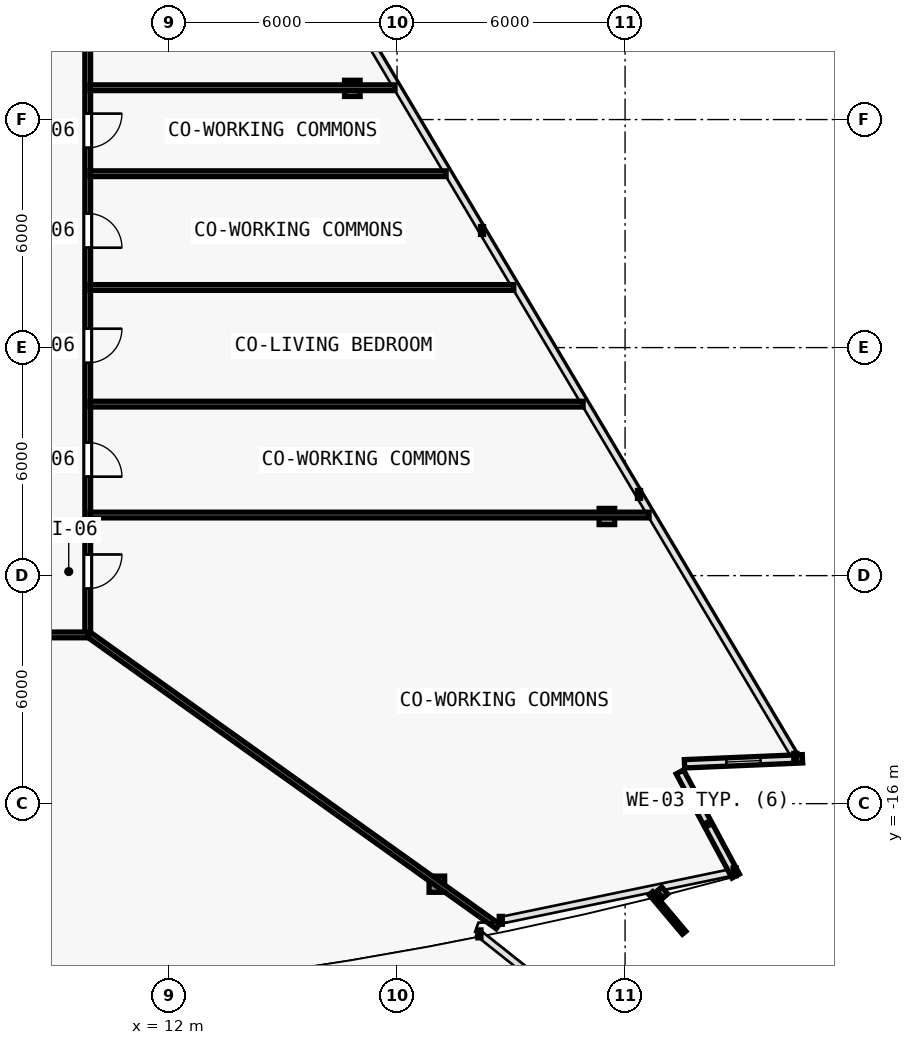
"""IFC4 building model, lengths in metres.
Left out: names, types, materials, properties, quantities, classifications, styles, units other than length and angle.
Written with IfcOpenShell. Run it as: python <this file> out.ifc"""

import sys

from ifc_helpers import new_model, si_unit, direction, frame, frame_2d, origin, origin_2d, place, context, subcontext, project, spatial, rectangle, i_section, extrude, element, fill, save


model = new_model("IFC4")
c1 = context("Model", 3, precision=1e-05, world=origin(), true_north=direction((0.0, 1.0)))
c2 = subcontext(c1, "Body", "Model", "MODEL_VIEW")
j1 = project(units=[si_unit("LENGTHUNIT", "METRE"), si_unit("PLANEANGLEUNIT", "RADIAN")], contexts=[c1])
p1 = place(None, origin())
s1 = spatial("IfcSite", under=j1, at=p1, CompositionType="ELEMENT")
p2 = place(p1, origin())
s2 = spatial("IfcBuilding", under=s1, at=p2, CompositionType="ELEMENT")
p3 = place(p2, frame((0.0, 0.0, 93.3)))
s3 = spatial("IfcBuildingStorey", under=s2, at=p3, CompositionType="ELEMENT", Elevation=93.3)
p4 = place(p3, frame((19.047, -18.119, 0.005), z_axis=(-0.020594847032, 0.03357707734, 0.999223914922), x_axis=(-0.852427604955, -0.522845271865, 0.0)))
e1 = element("IfcColumn", 1, at=p4, inside=s3, PredefinedType="COLUMN", context=c2, shape_type="SweptSolid", body=[
    extrude(i_section(OverallWidth=0.409, OverallDepth=0.425, WebThickness=0.021, FlangeThickness=0.034, FilletRadius=0.015, at=origin_2d()), origin(), (0.0, 0.0, 1.0), 3.592),
])
p5 = place(p3, frame((23.521, -8.444, 0.005), z_axis=(-0.026105663043, 0.021618752208, 0.999425396871), x_axis=(-0.637813971185, -0.770190455771, 0.0)))
e2 = element("IfcColumn", 2, at=p5, inside=s3, PredefinedType="COLUMN", context=c2, shape_type="SweptSolid", body=[
    extrude(i_section(OverallWidth=0.409, OverallDepth=0.425, WebThickness=0.021, FlangeThickness=0.034, FilletRadius=0.015, at=origin_2d()), origin(), (0.0, 0.0, 1.0), 3.591),
])
p6 = place(p3, frame((16.823, 2.821, 0.005), z_axis=(-0.018974023902, 0.009521015578, 0.999774642947), x_axis=(-0.44849454954, -0.893785566583, 0.0)))
e3 = element("IfcColumn", 3, at=p6, inside=s3, PredefinedType="COLUMN", context=c2, shape_type="SweptSolid", body=[
    extrude(i_section(OverallWidth=0.409, OverallDepth=0.425, WebThickness=0.021, FlangeThickness=0.034, FilletRadius=0.015, at=origin_2d()), origin(), (0.0, 0.0, 1.0), 3.59),
])
p7 = place(p3, frame((25.442, -15.165, 0.0), z_axis=(0.0, 0.0, 1.0), x_axis=(0.472811757317, -0.881163459378, 0.0)))
e4 = element("IfcWall", 4, at=p7, inside=s3, PredefinedType="SOLIDWALL", context=c2, shape_type="SweptSolid", body=[
    extrude(rectangle(XDim=3.11, YDim=0.22, at=frame_2d((1.555, 0.0))), origin(), (0.0, 0.0, 1.0), 3.35),
])
p8 = place(p3, frame((28.667, -14.819, 0.0), z_axis=(0.0, 0.0, 1.0), x_axis=(-0.99909228571, -0.042598176436, 0.0)))
e5 = element("IfcWall", 5, at=p8, inside=s3, PredefinedType="SOLIDWALL", context=c2, shape_type="SweptSolid", body=[
    extrude(rectangle(XDim=3.106, YDim=0.22, at=frame_2d((1.553, 0.0))), origin(), (0.0, 0.0, 1.0), 3.35),
])
p9 = place(p8, frame((1.103, 0.0, 0.62)))
e6 = element("IfcOpeningElement", 6, at=p9, cuts=e5, PredefinedType="OPENING", context=c2, shape_type="SweptSolid", body=[
    extrude(rectangle(XDim=0.9, YDim=1.6, at=frame_2d((0.45, 0.8))), frame((0.0, 0.12, 0.0), z_axis=(0.0, -1.0, 0.0), x_axis=(1.0, 0.0, 0.0)), (0.0, 0.0, 1.0), 0.24),
])
p10 = place(p3, frame((9.86, 8.426, 0.0), z_axis=(0.0, 0.0, 1.0), x_axis=(0.0, -1.0, 0.0)))
e7 = element("IfcWall", 7, at=p10, inside=s3, PredefinedType="PARTITIONING", context=c2, shape_type="SweptSolid", body=[
    extrude(rectangle(XDim=19.986, YDim=0.15, at=frame_2d((9.993, 0.0))), origin(), (0.0, 0.0, 1.0), 2.705),
])
p11 = place(p10, frame((17.869, 0.0, 0.0)))
e8 = element("IfcOpeningElement", 8, at=p11, cuts=e7, PredefinedType="OPENING", context=c2, shape_type="SweptSolid", body=[
    extrude(rectangle(XDim=0.9, YDim=2.1, at=frame_2d((0.45, 1.05))), frame((0.0, 0.085, 0.0), z_axis=(0.0, -1.0, 0.0), x_axis=(1.0, 0.0, 0.0)), (0.0, 0.0, 1.0), 0.17),
])
p12 = place(p10, frame((14.922, 0.0, 0.0)))
e9 = element("IfcOpeningElement", 9, at=p12, cuts=e7, PredefinedType="OPENING", context=c2, shape_type="SweptSolid", body=[
    extrude(rectangle(XDim=0.9, YDim=2.1, at=frame_2d((0.45, 1.05))), frame((0.0, 0.085, 0.0), z_axis=(0.0, -1.0, 0.0), x_axis=(1.0, 0.0, 0.0)), (0.0, 0.0, 1.0), 0.17),
])
p13 = place(p10, frame((11.928, 0.0, 0.0)))
e10 = element("IfcOpeningElement", 10, at=p13, cuts=e7, PredefinedType="OPENING", context=c2, shape_type="SweptSolid", body=[
    extrude(rectangle(XDim=0.9, YDim=2.1, at=frame_2d((0.45, 1.05))), frame((0.0, 0.085, 0.0), z_axis=(0.0, -1.0, 0.0), x_axis=(1.0, 0.0, 0.0)), (0.0, 0.0, 1.0), 0.17),
])
p14 = place(p10, frame((8.897, 0.0, 0.0)))
e11 = element("IfcOpeningElement", 11, at=p14, cuts=e7, PredefinedType="OPENING", context=c2, shape_type="SweptSolid", body=[
    extrude(rectangle(XDim=0.9, YDim=2.1, at=frame_2d((0.45, 1.05))), frame((0.0, 0.085, 0.0), z_axis=(0.0, -1.0, 0.0), x_axis=(1.0, 0.0, 0.0)), (0.0, 0.0, 1.0), 0.17),
])
p15 = place(p10, frame((6.269, 0.0, 0.0)))
e12 = element("IfcOpeningElement", 12, at=p15, cuts=e7, PredefinedType="OPENING", context=c2, shape_type="SweptSolid", body=[
    extrude(rectangle(XDim=0.9, YDim=2.1, at=frame_2d((0.45, 1.05))), frame((0.0, 0.085, 0.0), z_axis=(0.0, -1.0, 0.0), x_axis=(1.0, 0.0, 0.0)), (0.0, 0.0, 1.0), 0.17),
])
p16 = place(p10, frame((2.433, 0.0, 0.0)))
e13 = element("IfcOpeningElement", 13, at=p16, cuts=e7, PredefinedType="OPENING", context=c2, shape_type="SweptSolid", body=[
    extrude(rectangle(XDim=0.9, YDim=2.1, at=frame_2d((0.45, 1.05))), frame((0.0, 0.085, 0.0), z_axis=(0.0, -1.0, 0.0), x_axis=(1.0, 0.0, 0.0)), (0.0, 0.0, 1.0), 0.17),
])
p17 = place(p3, frame((9.86, -11.56, 0.0), z_axis=(0.0, 0.0, 1.0), x_axis=(-1.0, 0.0, 0.0)))
e14 = element("IfcWall", 14, at=p17, inside=s3, PredefinedType="PARTITIONING", context=c2, shape_type="SweptSolid", body=[
    extrude(rectangle(XDim=6.78, YDim=0.15, at=frame_2d((3.39, 0.0))), origin(), (0.0, 0.0, 1.0), 2.825),
])
p18 = place(p17, frame((2.94, 0.0, 0.0)))
e15 = element("IfcOpeningElement", 15, at=p18, cuts=e14, PredefinedType="OPENING", context=c2, shape_type="SweptSolid", body=[
    extrude(rectangle(XDim=0.9, YDim=2.1, at=frame_2d((0.45, 1.05))), frame((0.0, 0.085, 0.0), z_axis=(0.0, -1.0, 0.0), x_axis=(1.0, 0.0, 0.0)), (0.0, 0.0, 1.0), 0.17),
])
p19 = place(p3, frame((9.896, -11.558, 0.0), z_axis=(0.0, 0.0, 1.0), x_axis=(0.81409664299, -0.580729417089, 0.0)))
e16 = element("IfcWall", 16, at=p19, inside=s3, PredefinedType="PARTITIONING", context=c2, shape_type="SweptSolid", body=[
    extrude(rectangle(XDim=13.212, YDim=0.15, at=frame_2d((6.606, 0.0))), origin(), (0.0, 0.0, 1.0), 2.775),
])
p20 = place(p3, frame((9.92, -8.405, 0.0), z_axis=(0.0, 0.0, 1.0), x_axis=(1.0, 0.0, 0.0)))
e17 = element("IfcWall", 17, at=p20, inside=s3, PredefinedType="PARTITIONING", context=c2, shape_type="SweptSolid", body=[
    extrude(rectangle(XDim=14.711, YDim=0.15, at=frame_2d((7.355, 0.0))), origin(), (0.0, 0.0, 1.0), 2.705),
])
p21 = place(p3, frame((9.92, 2.838, 0.0), z_axis=(0.0, 0.0, 1.0), x_axis=(1.0, 0.0, 0.0)))
e18 = element("IfcWall", 18, at=p21, inside=s3, PredefinedType="PARTITIONING", context=c2, shape_type="SweptSolid", body=[
    extrude(rectangle(XDim=8.025, YDim=0.15, at=frame_2d((4.013, 0.0))), origin(), (0.0, 0.0, 1.0), 2.835),
])
p22 = place(p3, frame((9.92, -2.418, 0.0), z_axis=(0.0, 0.0, 1.0), x_axis=(1.0, 0.0, 0.0)))
e19 = element("IfcWall", 19, at=p22, inside=s3, PredefinedType="PARTITIONING", context=c2, shape_type="SweptSolid", body=[
    extrude(rectangle(XDim=11.15, YDim=0.15, at=frame_2d((5.575, 0.0))), origin(), (0.0, 0.0, 1.0), 2.835),
])
p23 = place(p3, frame((9.92, -5.487, 0.0), z_axis=(0.0, 0.0, 1.0), x_axis=(1.0, 0.0, 0.0)))
e20 = element("IfcWall", 20, at=p23, inside=s3, PredefinedType="PARTITIONING", context=c2, shape_type="SweptSolid", body=[
    extrude(rectangle(XDim=12.975, YDim=0.15, at=frame_2d((6.488, 0.0))), origin(), (0.0, 0.0, 1.0), 2.835),
])
p24 = place(p3, frame((9.92, 0.575, 0.0), z_axis=(0.0, 0.0, 1.0), x_axis=(1.0, 0.0, 0.0)))
e21 = element("IfcWall", 21, at=p24, inside=s3, PredefinedType="PARTITIONING", context=c2, shape_type="SweptSolid", body=[
    extrude(rectangle(XDim=9.37, YDim=0.15, at=frame_2d((4.685, 0.0))), origin(), (0.0, 0.0, 1.0), 2.835),
])
p25 = place(p9, origin())
e22 = element("IfcWindow", 22, at=p25, inside=s3, PartitioningType="SINGLE_PANEL", PredefinedType="WINDOW", context=c2, shape_type="SweptSolid", body=[
    extrude(rectangle(XDim=0.9, YDim=1.6, at=frame_2d((0.45, 0.8))), frame((0.0, 0.03, 0.0), z_axis=(0.0, -1.0, 0.0), x_axis=(1.0, 0.0, 0.0)), (0.0, 0.0, 1.0), 0.06),
])
fill(e6, e22)
p26 = place(p11, origin())
e23 = element("IfcDoor", 23, at=p26, inside=s3, OperationType="SINGLE_SWING_LEFT", PredefinedType="DOOR", context=c2, shape_type="SweptSolid", body=[
    extrude(rectangle(XDim=0.9, YDim=2.1, at=frame_2d((0.45, 1.05))), frame((0.0, 0.025, 0.0), z_axis=(0.0, -1.0, 0.0), x_axis=(1.0, 0.0, 0.0)), (0.0, 0.0, 1.0), 0.05),
])
fill(e8, e23)
p27 = place(p12, origin())
e24 = element("IfcDoor", 24, at=p27, inside=s3, OperationType="SINGLE_SWING_RIGHT", PredefinedType="DOOR", context=c2, shape_type="SweptSolid", body=[
    extrude(rectangle(XDim=0.9, YDim=2.1, at=frame_2d((0.45, 1.05))), frame((0.0, 0.025, 0.0), z_axis=(0.0, -1.0, 0.0), x_axis=(1.0, 0.0, 0.0)), (0.0, 0.0, 1.0), 0.05),
])
fill(e9, e24)
p28 = place(p13, origin())
e25 = element("IfcDoor", 25, at=p28, inside=s3, OperationType="SINGLE_SWING_LEFT", PredefinedType="DOOR", context=c2, shape_type="SweptSolid", body=[
    extrude(rectangle(XDim=0.9, YDim=2.1, at=frame_2d((0.45, 1.05))), frame((0.0, 0.025, 0.0), z_axis=(0.0, -1.0, 0.0), x_axis=(1.0, 0.0, 0.0)), (0.0, 0.0, 1.0), 0.05),
])
fill(e10, e25)
p29 = place(p14, origin())
e26 = element("IfcDoor", 26, at=p29, inside=s3, OperationType="SINGLE_SWING_RIGHT", PredefinedType="DOOR", context=c2, shape_type="SweptSolid", body=[
    extrude(rectangle(XDim=0.9, YDim=2.1, at=frame_2d((0.45, 1.05))), frame((0.0, 0.025, 0.0), z_axis=(0.0, -1.0, 0.0), x_axis=(1.0, 0.0, 0.0)), (0.0, 0.0, 1.0), 0.05),
])
fill(e11, e26)
p30 = place(p15, origin())
e27 = element("IfcDoor", 27, at=p30, inside=s3, OperationType="SINGLE_SWING_LEFT", PredefinedType="DOOR", context=c2, shape_type="SweptSolid", body=[
    extrude(rectangle(XDim=0.9, YDim=2.1, at=frame_2d((0.45, 1.05))), frame((0.0, 0.025, 0.0), z_axis=(0.0, -1.0, 0.0), x_axis=(1.0, 0.0, 0.0)), (0.0, 0.0, 1.0), 0.05),
])
fill(e12, e27)
save(model, sys.argv[1])
